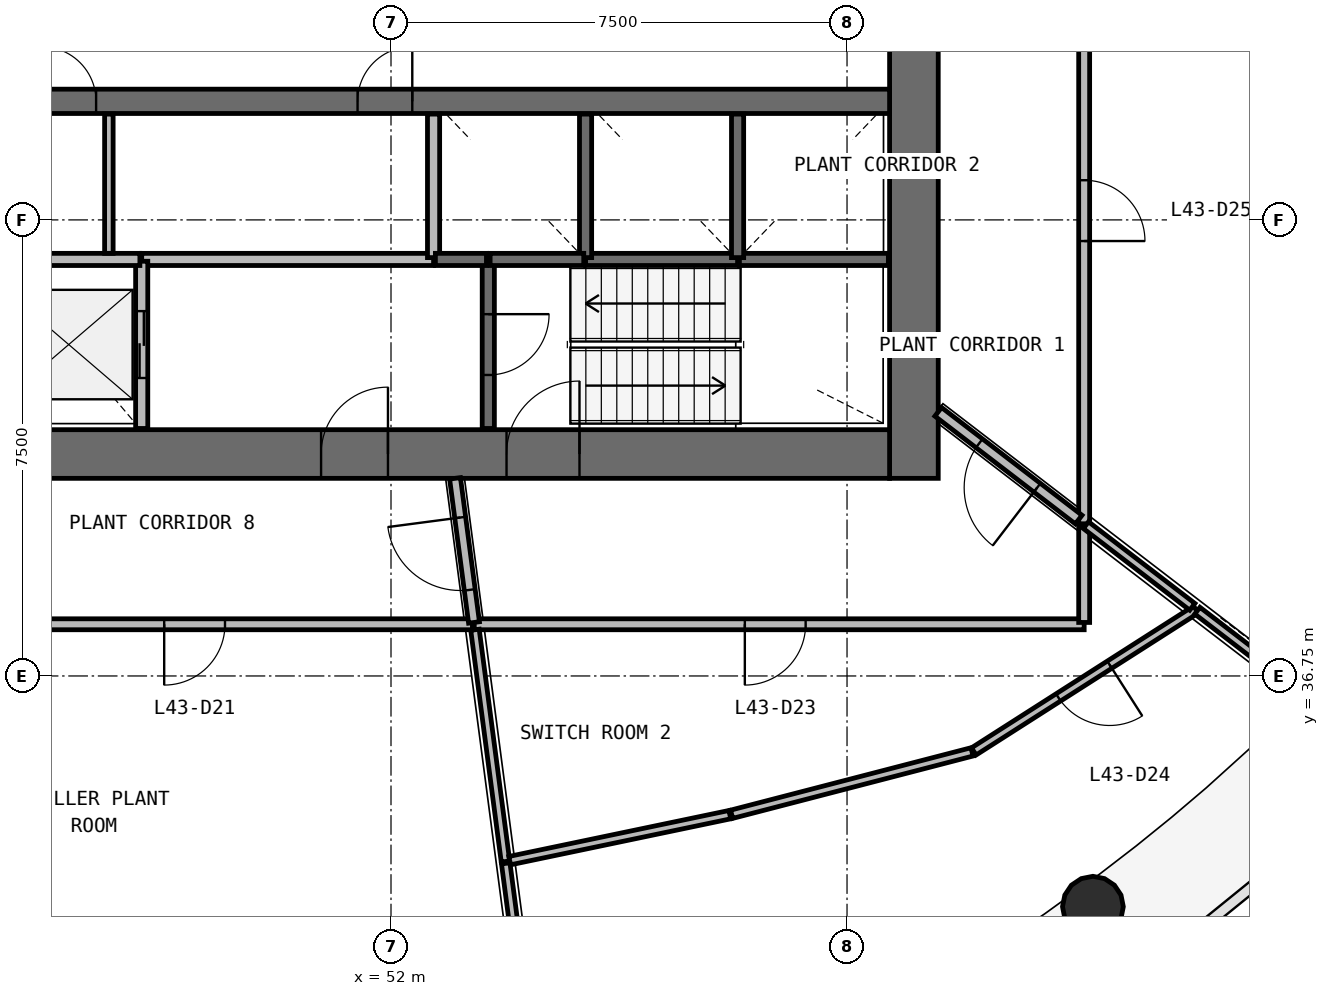
"""IFC4 building model, lengths in metres.
Left out: names, types, materials, properties, quantities, classifications, styles, units other than length and angle.
Written with IfcOpenShell. Run it as: python <this file> out.ifc"""

import sys

from ifc_helpers import new_model, si_unit, direction, frame, frame_2d, origin, origin_2d, place, context, subcontext, project, spatial, rectangle, circle, extrude, source, transform, mapped, element, fill, save


model = new_model("IFC4")
c1 = context("Model", 3, precision=1e-05, world=origin(), true_north=direction((0.0, 1.0)))
c2 = subcontext(c1, "Body", "Model", "MODEL_VIEW")
j1 = project(units=[si_unit("LENGTHUNIT", "METRE"), si_unit("PLANEANGLEUNIT", "RADIAN")], contexts=[c1])
p1 = place(None, origin())
s1 = spatial("IfcSite", under=j1, at=p1, CompositionType="ELEMENT")
p2 = place(p1, origin())
s2 = spatial("IfcBuilding", under=s1, at=p2, CompositionType="ELEMENT")
p3 = place(p2, frame((0.0, 0.0, 179.9)))
s3 = spatial("IfcBuildingStorey", under=s2, at=p3, CompositionType="ELEMENT", Elevation=179.9)
p4 = place(p3, frame((60.6, 40.0, 0.0), z_axis=(0.0, 0.0, 1.0), x_axis=(0.0, 1.0, 0.0)))
e1 = element("IfcWall", 1, at=p4, inside=s3, PredefinedType="SHEAR", context=c2, shape_type="SweptSolid", body=[
    extrude(rectangle(XDim=16.0, YDim=0.8, at=frame_2d((8.0, 0.0))), origin(), (0.0, 0.0, 1.0), 3.9),
])
p5 = place(p4, frame((7.1, 0.0, 0.0)))
e2 = element("IfcOpeningElement", 2, at=p5, cuts=e1, PredefinedType="OPENING", context=c2, shape_type="SweptSolid", body=[
    extrude(rectangle(XDim=1.8, YDim=2.1, at=frame_2d((0.9, 1.05))), frame((0.0, 0.41, 0.0), z_axis=(0.0, -1.0, 0.0), x_axis=(1.0, 0.0, 0.0)), (0.0, 0.0, 1.0), 0.82),
])
p6 = place(p3, frame((43.8, 40.4, 0.0), z_axis=(0.0, 0.0, 1.0), x_axis=(1.0, 0.0, 0.0)))
e3 = element("IfcWall", 3, at=p6, inside=s3, PredefinedType="SHEAR", context=c2, shape_type="SweptSolid", body=[
    extrude(rectangle(XDim=16.4, YDim=0.8, at=frame_2d((8.2, 0.0))), origin(), (0.0, 0.0, 1.0), 3.9),
])
p7 = place(p6, frame((10.1, 0.0, 0.0)))
e4 = element("IfcOpeningElement", 4, at=p7, cuts=e3, PredefinedType="OPENING", context=c2, shape_type="SweptSolid", body=[
    extrude(rectangle(XDim=1.2, YDim=2.1, at=frame_2d((0.6, 1.05))), frame((0.0, 0.41, 0.0), z_axis=(0.0, -1.0, 0.0), x_axis=(1.0, 0.0, 0.0)), (0.0, 0.0, 1.0), 0.82),
])
p8 = place(p6, frame((7.05, 0.0, 0.0)))
e5 = element("IfcOpeningElement", 5, at=p8, cuts=e3, PredefinedType="OPENING", context=c2, shape_type="SweptSolid", body=[
    extrude(rectangle(XDim=1.1, YDim=2.1, at=frame_2d((0.55, 1.05))), frame((0.0, 0.41, 0.0), z_axis=(0.0, -1.0, 0.0), x_axis=(1.0, 0.0, 0.0)), (0.0, 0.0, 1.0), 0.82),
])
p9 = place(p6, frame((0.5, 0.0, 0.0)))
e6 = element("IfcOpeningElement", 6, at=p9, cuts=e3, PredefinedType="OPENING", context=c2, shape_type="SweptSolid", body=[
    extrude(rectangle(XDim=0.8, YDim=2.1, at=frame_2d((0.4, 1.05))), frame((0.0, 0.41, 0.0), z_axis=(0.0, -1.0, 0.0), x_axis=(1.0, 0.0, 0.0)), (0.0, 0.0, 1.0), 0.82),
])
p10 = place(p3, frame((43.8, 46.2, 0.0), z_axis=(0.0, 0.0, 1.0), x_axis=(1.0, 0.0, 0.0)))
e7 = element("IfcWall", 7, at=p10, inside=s3, PredefinedType="SHEAR", context=c2, shape_type="SweptSolid", body=[
    extrude(rectangle(XDim=16.4, YDim=0.4, at=frame_2d((8.2, 0.0))), origin(), (0.0, 0.0, 1.0), 3.9),
])
p11 = place(p10, frame((2.45, 0.0, 0.0)))
e8 = element("IfcOpeningElement", 8, at=p11, cuts=e7, PredefinedType="OPENING", context=c2, shape_type="SweptSolid", body=[
    extrude(rectangle(XDim=0.9, YDim=2.1, at=frame_2d((0.45, 1.05))), frame((0.0, 0.21, 0.0), z_axis=(0.0, -1.0, 0.0), x_axis=(1.0, 0.0, 0.0)), (0.0, 0.0, 1.0), 0.42),
])
p12 = place(p10, frame((7.65, 0.0, 0.0)))
e9 = element("IfcOpeningElement", 9, at=p12, cuts=e7, PredefinedType="OPENING", context=c2, shape_type="SweptSolid", body=[
    extrude(rectangle(XDim=0.9, YDim=2.1, at=frame_2d((0.45, 1.05))), frame((0.0, 0.21, 0.0), z_axis=(0.0, -1.0, 0.0), x_axis=(1.0, 0.0, 0.0)), (0.0, 0.0, 1.0), 0.42),
])
m1 = source(origin(), c2, "Body", "SweptSolid", [
    extrude(circle(Radius=0.5, at=origin_2d()), origin(), (0.0, 0.0, 1.0), 3.58),
])
p13 = place(p3, frame((63.544, 32.956, 0.0), z_axis=(0.0, 0.0, 1.0), x_axis=(1.0, 0.0, 0.0)))
e10 = element("IfcColumn", 10, at=p13, inside=s3, PredefinedType="COLUMN", context=c2, shape_type="MappedRepresentation", body=[
    mapped(m1, transform((0.0, 0.0, 0.0), scale=1.0)),
])
p14 = place(p3, frame((52.7, 43.6, 0.0), z_axis=(0.0, 0.0, 1.0), x_axis=(-1.0, 0.0, 0.0)))
e11 = element("IfcWall", 11, at=p14, inside=s3, PredefinedType="SOLIDWALL", context=c2, shape_type="SweptSolid", body=[
    extrude(rectangle(XDim=4.8, YDim=0.2, at=frame_2d((2.4, 0.0))), origin(), (0.0, 0.0, 1.0), 3.58),
])
p15 = place(p3, frame((47.9, 40.82, 0.0), z_axis=(0.0, 0.0, 1.0), x_axis=(0.0, 1.0, 0.0)))
e12 = element("IfcWall", 12, at=p15, inside=s3, PredefinedType="SOLIDWALL", context=c2, shape_type="SweptSolid", body=[
    extrude(rectangle(XDim=2.75, YDim=0.2, at=frame_2d((1.375, 0.0))), origin(), (0.0, 0.0, 1.0), 3.58),
])
p16 = place(p15, frame((0.83, 0.0, 0.0)))
e13 = element("IfcOpeningElement", 13, at=p16, cuts=e12, PredefinedType="OPENING", context=c2, shape_type="SweptSolid", body=[
    extrude(rectangle(XDim=1.1, YDim=2.1, at=frame_2d((0.55, 1.05))), frame((0.0, 0.11, 0.0), z_axis=(0.0, -1.0, 0.0), x_axis=(1.0, 0.0, 0.0)), (0.0, 0.0, 1.0), 0.22),
])
p17 = place(p3, frame((53.6, 43.6, 0.0), z_axis=(0.0, 0.0, 1.0), x_axis=(0.0, -1.0, 0.0)))
e14 = element("IfcWall", 14, at=p17, inside=s3, PredefinedType="SOLIDWALL", context=c2, shape_type="SweptSolid", body=[
    extrude(rectangle(XDim=2.78, YDim=0.2, at=frame_2d((1.39, 0.0))), origin(), (0.0, 0.0, 1.0), 3.58),
])
p18 = place(p17, frame((0.9, 0.0, 0.0)))
e15 = element("IfcOpeningElement", 15, at=p18, cuts=e14, PredefinedType="OPENING", context=c2, shape_type="SweptSolid", body=[
    extrude(rectangle(XDim=1.0, YDim=2.1, at=frame_2d((0.5, 1.05))), frame((0.0, 0.11, 0.0), z_axis=(0.0, -1.0, 0.0), x_axis=(1.0, 0.0, 0.0)), (0.0, 0.0, 1.0), 0.22),
])
p19 = place(p3, frame((55.2, 43.6, 0.0), z_axis=(0.0, 0.0, 1.0), x_axis=(1.0, 0.0, 0.0)))
e16 = element("IfcWall", 16, at=p19, inside=s3, PredefinedType="SOLIDWALL", context=c2, shape_type="SweptSolid", body=[
    extrude(rectangle(XDim=2.5, YDim=0.2, at=frame_2d((1.25, 0.0))), origin(), (0.0, 0.0, 1.0), 3.58),
])
p20 = place(p3, frame((57.73, 43.6, 0.0), z_axis=(0.0, 0.0, 1.0), x_axis=(1.0, 0.0, 0.0)))
e17 = element("IfcWall", 17, at=p20, inside=s3, PredefinedType="SOLIDWALL", context=c2, shape_type="SweptSolid", body=[
    extrude(rectangle(XDim=2.45, YDim=0.2, at=frame_2d((1.225, 0.0))), origin(), (0.0, 0.0, 1.0), 3.58),
])
p21 = place(p3, frame((47.87, 43.6, 0.0), z_axis=(0.0, 0.0, 1.0), x_axis=(-1.0, 0.0, 0.0)))
e18 = element("IfcWall", 18, at=p21, inside=s3, PredefinedType="SOLIDWALL", context=c2, shape_type="SweptSolid", body=[
    extrude(rectangle(XDim=2.34, YDim=0.2, at=frame_2d((1.17, 0.0))), origin(), (0.0, 0.0, 1.0), 3.58),
])
for number, where, z_axis, x_axis in (
    (19, (52.7, 45.99, 0.0), (0.0, 0.0, 1.0), (0.0, -1.0, 0.0)),
    (20, (55.2, 43.63, 0.0), (0.0, 0.0, 1.0), (0.0, 1.0, 0.0)),
    (21, (57.7, 43.63, 0.0), (0.0, 0.0, 1.0), (0.0, 1.0, 0.0)),
):
    element("IfcWall", number, at=place(p3, frame(where, z_axis=z_axis, x_axis=x_axis)), inside=s3, PredefinedType="SOLIDWALL", context=c2, shape_type="SweptSolid", body=[
        extrude(rectangle(XDim=2.36, YDim=0.2, at=frame_2d((1.18, 0.0))), origin(), (0.0, 0.0, 1.0), 3.58),
    ])
p22 = place(p3, frame((53.63, 43.6, 0.0), z_axis=(0.0, 0.0, 1.0), x_axis=(1.0, 0.0, 0.0)))
e22 = element("IfcWall", 22, at=p22, inside=s3, PredefinedType="SOLIDWALL", context=c2, shape_type="SweptSolid", body=[
    extrude(rectangle(XDim=1.54, YDim=0.2, at=frame_2d((0.77, 0.0))), origin(), (0.0, 0.0, 1.0), 3.58),
])
p23 = place(p3, frame((52.73, 43.6, 0.0), z_axis=(0.0, 0.0, 1.0), x_axis=(1.0, 0.0, 0.0)))
e23 = element("IfcWall", 23, at=p23, inside=s3, PredefinedType="SOLIDWALL", context=c2, shape_type="SweptSolid", body=[
    extrude(rectangle(XDim=0.84, YDim=0.2, at=frame_2d((0.42, 0.0))), origin(), (0.0, 0.0, 1.0), 3.58),
])
p24 = place(p3, frame((63.4, 49.501, 0.0), z_axis=(0.0, 0.0, 1.0), x_axis=(0.0, -1.0, 0.0)))
e24 = element("IfcWall", 24, at=p24, inside=s3, PredefinedType="PARTITIONING", context=c2, shape_type="SweptSolid", body=[
    extrude(rectangle(XDim=10.248, YDim=0.18, at=frame_2d((5.124, 0.0))), origin(), (0.0, 0.0, 1.0), 2.38),
])
p25 = place(p24, frame((4.598, 0.0, 0.0)))
e25 = element("IfcOpeningElement", 25, at=p25, cuts=e24, PredefinedType="OPENING", context=c2, shape_type="SweptSolid", body=[
    extrude(rectangle(XDim=1.0, YDim=2.1, at=frame_2d((0.5, 1.05))), frame((0.0, 0.1, 0.0), z_axis=(0.0, -1.0, 0.0), x_axis=(1.0, 0.0, 0.0)), (0.0, 0.0, 1.0), 0.2),
])
p26 = place(p3, frame((63.4, 37.6, 0.0), z_axis=(0.0, 0.0, 1.0), x_axis=(-1.0, 0.0, 0.0)))
e26 = element("IfcWall", 26, at=p26, inside=s3, PredefinedType="PARTITIONING", context=c2, shape_type="SweptSolid", body=[
    extrude(rectangle(XDim=10.031, YDim=0.18, at=frame_2d((5.015, 0.0))), origin(), (0.0, 0.0, 1.0), 2.38),
])
p27 = place(p26, frame((4.581, 0.0, 0.0)))
e27 = element("IfcOpeningElement", 27, at=p27, cuts=e26, PredefinedType="OPENING", context=c2, shape_type="SweptSolid", body=[
    extrude(rectangle(XDim=1.0, YDim=2.1, at=frame_2d((0.5, 1.05))), frame((0.0, 0.1, 0.0), z_axis=(0.0, -1.0, 0.0), x_axis=(1.0, 0.0, 0.0)), (0.0, 0.0, 1.0), 0.2),
])
p28 = place(p3, frame((53.339, 37.6, 0.0), z_axis=(0.0, 0.0, 1.0), x_axis=(-1.0, 0.0, 0.0)))
e28 = element("IfcWall", 28, at=p28, inside=s3, PredefinedType="PARTITIONING", context=c2, shape_type="SweptSolid", body=[
    extrude(rectangle(XDim=9.319, YDim=0.18, at=frame_2d((4.66, 0.0))), origin(), (0.0, 0.0, 1.0), 2.38),
])
p29 = place(p28, frame((4.069, 0.0, 0.0)))
e29 = element("IfcOpeningElement", 29, at=p29, cuts=e28, PredefinedType="OPENING", context=c2, shape_type="SweptSolid", body=[
    extrude(rectangle(XDim=1.0, YDim=2.1, at=frame_2d((0.5, 1.05))), frame((0.0, 0.1, 0.0), z_axis=(0.0, -1.0, 0.0), x_axis=(1.0, 0.0, 0.0)), (0.0, 0.0, 1.0), 0.2),
])
p30 = place(p3, frame((63.31, 39.322, 0.0), z_axis=(0.0, 0.0, 1.0), x_axis=(-0.793371480341, 0.608737787706, 0.0)))
e30 = element("IfcWall", 30, at=p30, inside=s3, PredefinedType="PARTITIONING", context=c2, shape_type="SweptSolid", body=[
    extrude(rectangle(XDim=2.912, YDim=0.18, at=frame_2d((1.456, 0.0))), origin(), (0.0, 0.0, 1.0), 2.38),
])
p31 = place(p30, frame((0.862, 0.0, 0.0)))
e31 = element("IfcOpeningElement", 31, at=p31, cuts=e30, PredefinedType="OPENING", context=c2, shape_type="SweptSolid", body=[
    extrude(rectangle(XDim=1.2, YDim=2.1, at=frame_2d((0.6, 1.05))), frame((0.0, 0.1, 0.0), z_axis=(0.0, -1.0, 0.0), x_axis=(1.0, 0.0, 0.0)), (0.0, 0.0, 1.0), 0.2),
])
p32 = place(p3, frame((53.365, 37.63, 0.0), z_axis=(0.0, 0.0, 1.0), x_axis=(-0.130504701654, 0.991447690424, 0.0)))
e32 = element("IfcWall", 32, at=p32, inside=s3, PredefinedType="PARTITIONING", context=c2, shape_type="SweptSolid", body=[
    extrude(rectangle(XDim=2.391, YDim=0.18, at=frame_2d((1.195, 0.0))), origin(), (0.0, 0.0, 1.0), 2.38),
])
p33 = place(p32, frame((0.541, 0.0, 0.0)))
e33 = element("IfcOpeningElement", 33, at=p33, cuts=e32, PredefinedType="OPENING", context=c2, shape_type="SweptSolid", body=[
    extrude(rectangle(XDim=1.2, YDim=2.1, at=frame_2d((0.6, 1.05))), frame((0.0, 0.1, 0.0), z_axis=(0.0, -1.0, 0.0), x_axis=(1.0, 0.0, 0.0)), (0.0, 0.0, 1.0), 0.2),
])
p34 = place(p3, frame((63.4, 37.63, 0.0), z_axis=(0.0, 0.0, 1.0), x_axis=(0.0, 1.0, 0.0)))
e34 = element("IfcWall", 34, at=p34, inside=s3, PredefinedType="PARTITIONING", context=c2, shape_type="SweptSolid", body=[
    extrude(rectangle(XDim=1.593, YDim=0.18, at=frame_2d((0.796, 0.0))), origin(), (0.0, 0.0, 1.0), 2.38),
])
p35 = place(p3, frame((65.238, 37.842, 0.0), z_axis=(0.0, 0.0, 1.0), x_axis=(-0.842765106191, -0.538281502364, 0.0)))
e35 = element("IfcWall", 35, at=p35, inside=s3, PredefinedType="PARTITIONING", context=c2, shape_type="SweptSolid", body=[
    extrude(rectangle(XDim=4.335, YDim=0.14, at=frame_2d((2.167, 0.0))), origin(), (0.0, 0.0, 1.0), 2.38),
])
p36 = place(p35, frame((1.685, 0.0, 0.0)))
e36 = element("IfcOpeningElement", 36, at=p36, cuts=e35, PredefinedType="OPENING", context=c2, shape_type="SweptSolid", body=[
    extrude(rectangle(XDim=1.0, YDim=2.1, at=frame_2d((0.5, 1.05))), frame((0.0, 0.08, 0.0), z_axis=(0.0, -1.0, 0.0), x_axis=(1.0, 0.0, 0.0)), (0.0, 0.0, 1.0), 0.16),
])
p37 = place(p3, frame((57.602, 34.476, 0.0), z_axis=(0.0, 0.0, 1.0), x_axis=(0.96794524956, 0.251161290518, 0.0)))
e37 = element("IfcWall", 37, at=p37, inside=s3, PredefinedType="PARTITIONING", context=c2, shape_type="SweptSolid", body=[
    extrude(rectangle(XDim=4.084, YDim=0.14, at=frame_2d((2.042, 0.0))), origin(), (0.0, 0.0, 1.0), 2.38),
])
p38 = place(p3, frame((53.381, 37.51, 0.0), z_axis=(0.0, 0.0, 1.0), x_axis=(0.130503795096, -0.991447809754, 0.0)))
e38 = element("IfcWall", 38, at=p38, inside=s3, PredefinedType="PARTITIONING", context=c2, shape_type="SweptSolid", body=[
    extrude(rectangle(XDim=3.844, YDim=0.14, at=frame_2d((1.922, 0.0))), origin(), (0.0, 0.0, 1.0), 2.38),
])
p39 = place(p3, frame((53.951, 33.713, 0.0), z_axis=(0.0, 0.0, 1.0), x_axis=(0.978877627359, 0.204447036308, 0.0)))
e39 = element("IfcWall", 39, at=p39, inside=s3, PredefinedType="PARTITIONING", context=c2, shape_type="SweptSolid", body=[
    extrude(rectangle(XDim=3.699, YDim=0.14, at=frame_2d((1.85, 0.0))), origin(), (0.0, 0.0, 1.0), 2.38),
])
p40 = place(p3, frame((47.36, 43.7, 0.0), z_axis=(0.0, 0.0, 1.0), x_axis=(0.0, 1.0, 0.0)))
e40 = element("IfcWall", 40, at=p40, inside=s3, PredefinedType="PARTITIONING", context=c2, shape_type="SweptSolid", body=[
    extrude(rectangle(XDim=2.29, YDim=0.14, at=frame_2d((1.145, 0.0))), origin(), (0.0, 0.0, 1.0), 2.88),
])
p41 = place(p3, frame((63.429, 39.23, 0.0), z_axis=(0.0, 0.0, 1.0), x_axis=(0.793376463814, -0.608731292662, 0.0)))
e41 = element("IfcWall", 41, at=p41, inside=s3, PredefinedType="PARTITIONING", context=c2, shape_type="SweptSolid", body=[
    extrude(rectangle(XDim=2.206, YDim=0.14, at=frame_2d((1.103, 0.0))), origin(), (0.0, 0.0, 1.0), 2.38),
])
p42 = place(p3, frame((65.262, 37.824, 0.0), z_axis=(0.0, 0.0, 1.0), x_axis=(0.793315822565, -0.608810319942, 0.0)))
e42 = element("IfcWall", 42, at=p42, inside=s3, PredefinedType="PARTITIONING", context=c2, shape_type="SweptSolid", body=[
    extrude(rectangle(XDim=2.111, YDim=0.14, at=frame_2d((1.055, 0.0))), origin(), (0.0, 0.0, 1.0), 2.38),
])
p43 = place(p3, frame((53.887, 33.669, 0.0), z_axis=(0.0, 0.0, 1.0), x_axis=(0.130609007081, -0.991433955072, 0.0)))
e43 = element("IfcWall", 43, at=p43, inside=s3, PredefinedType="PARTITIONING", context=c2, shape_type="SweptSolid", body=[
    extrude(rectangle(XDim=1.553, YDim=0.14, at=frame_2d((0.777, 0.0))), origin(), (0.0, 0.0, 1.0), 2.38),
])
m2 = source(origin(), c2, "Body", "SweptSolid", [
    extrude(rectangle(XDim=1.1, YDim=2.1, at=frame_2d((0.55, 1.05))), frame((0.0, 0.025, 0.0), z_axis=(0.0, -1.0, 0.0), x_axis=(1.0, 0.0, 0.0)), (0.0, 0.0, 1.0), 0.05),
])
p44 = place(p16, origin())
e44 = element("IfcDoor", 44, at=p44, inside=s3, OperationType="DOUBLE_DOOR_SLIDING", PredefinedType="USERDEFINED", context=c2, shape_type="MappedRepresentation", body=[
    mapped(m2, transform((0.0, 0.0, 0.0), scale=1.0)),
])
fill(e13, e44)
m3 = source(origin(), c2, "Body", "SweptSolid", [
    extrude(rectangle(XDim=1.2, YDim=2.1, at=frame_2d((0.6, 1.05))), frame((0.0, 0.025, 0.0), z_axis=(0.0, -1.0, 0.0), x_axis=(1.0, 0.0, 0.0)), (0.0, 0.0, 1.0), 0.05),
])
p45 = place(p7, origin())
e45 = element("IfcDoor", 45, at=p45, inside=s3, OperationType="SINGLE_SWING_RIGHT", PredefinedType="DOOR", context=c2, shape_type="MappedRepresentation", body=[
    mapped(m3, transform((0.0, 0.0, 0.0), scale=1.0)),
])
fill(e4, e45)
m4 = source(origin(), c2, "Body", "SweptSolid", [
    extrude(rectangle(XDim=1.0, YDim=2.1, at=frame_2d((0.5, 1.05))), frame((0.0, 0.025, 0.0), z_axis=(0.0, -1.0, 0.0), x_axis=(1.0, 0.0, 0.0)), (0.0, 0.0, 1.0), 0.05),
])
p46 = place(p18, origin())
e46 = element("IfcDoor", 46, at=p46, inside=s3, OperationType="SINGLE_SWING_LEFT", PredefinedType="DOOR", context=c2, shape_type="MappedRepresentation", body=[
    mapped(m4, transform((0.0, 0.0, 0.0), scale=1.0)),
])
fill(e15, e46)
m5 = source(origin(), c2, "Body", "SweptSolid", [
    extrude(rectangle(XDim=1.1, YDim=2.1, at=frame_2d((0.55, 1.05))), frame((0.0, 0.025, 0.0), z_axis=(0.0, -1.0, 0.0), x_axis=(1.0, 0.0, 0.0)), (0.0, 0.0, 1.0), 0.05),
])
p47 = place(p8, origin())
e47 = element("IfcDoor", 47, at=p47, inside=s3, OperationType="SINGLE_SWING_RIGHT", PredefinedType="DOOR", context=c2, shape_type="MappedRepresentation", body=[
    mapped(m5, transform((0.0, 0.0, 0.0), scale=1.0)),
])
fill(e5, e47)
m6 = source(origin(), c2, "Body", "SweptSolid", [
    extrude(rectangle(XDim=1.0, YDim=2.1, at=frame_2d((0.5, 1.05))), frame((0.0, 0.025, 0.0), z_axis=(0.0, -1.0, 0.0), x_axis=(1.0, 0.0, 0.0)), (0.0, 0.0, 1.0), 0.05),
])
p48 = place(p29, origin())
e48 = element("IfcDoor", 48, at=p48, inside=s3, OperationType="SINGLE_SWING_RIGHT", PredefinedType="DOOR", context=c2, shape_type="MappedRepresentation", body=[
    mapped(m6, transform((0.0, 0.0, 0.0), scale=1.0)),
])
fill(e29, e48)
p49 = place(p27, origin())
e49 = element("IfcDoor", 49, at=p49, inside=s3, OperationType="SINGLE_SWING_RIGHT", PredefinedType="DOOR", context=c2, shape_type="MappedRepresentation", body=[
    mapped(m6, transform((0.0, 0.0, 0.0), scale=1.0)),
])
fill(e27, e49)
p50 = place(p36, origin())
e50 = element("IfcDoor", 50, at=p50, inside=s3, OperationType="SINGLE_SWING_LEFT", PredefinedType="DOOR", context=c2, shape_type="MappedRepresentation", body=[
    mapped(m6, transform((0.0, 0.0, 0.0), scale=1.0)),
])
fill(e36, e50)
p51 = place(p25, origin())
e51 = element("IfcDoor", 51, at=p51, inside=s3, OperationType="SINGLE_SWING_RIGHT", PredefinedType="DOOR", context=c2, shape_type="MappedRepresentation", body=[
    mapped(m6, transform((0.0, 0.0, 0.0), scale=1.0)),
])
fill(e25, e51)
m7 = source(origin(), c2, "Body", "SweptSolid", [
    extrude(rectangle(XDim=1.2, YDim=2.1, at=frame_2d((0.6, 1.05))), frame((0.0, 0.025, 0.0), z_axis=(0.0, -1.0, 0.0), x_axis=(1.0, 0.0, 0.0)), (0.0, 0.0, 1.0), 0.05),
])
p52 = place(p33, origin())
e52 = element("IfcDoor", 52, at=p52, inside=s3, OperationType="SINGLE_SWING_RIGHT", PredefinedType="DOOR", context=c2, shape_type="MappedRepresentation", body=[
    mapped(m7, transform((0.0, 0.0, 0.0), scale=1.0)),
])
fill(e33, e52)
p53 = place(p31, origin())
e53 = element("IfcDoor", 53, at=p53, inside=s3, OperationType="SINGLE_SWING_LEFT", PredefinedType="DOOR", context=c2, shape_type="MappedRepresentation", body=[
    mapped(m7, transform((0.0, 0.0, 0.0), scale=1.0)),
])
fill(e31, e53)
m8 = source(origin(), c2, "Body", "SweptSolid", [
    extrude(rectangle(XDim=0.9, YDim=2.1, at=frame_2d((0.45, 1.05))), frame((0.0, 0.025, 0.0), z_axis=(0.0, -1.0, 0.0), x_axis=(1.0, 0.0, 0.0)), (0.0, 0.0, 1.0), 0.05),
])
p54 = place(p11, origin())
e54 = element("IfcDoor", 54, at=p54, inside=s3, OperationType="SINGLE_SWING_LEFT", PredefinedType="DOOR", context=c2, shape_type="MappedRepresentation", body=[
    mapped(m8, transform((0.0, 0.0, 0.0), scale=1.0)),
])
fill(e8, e54)
p55 = place(p12, origin())
e55 = element("IfcDoor", 55, at=p55, inside=s3, OperationType="SINGLE_SWING_RIGHT", PredefinedType="DOOR", context=c2, shape_type="MappedRepresentation", body=[
    mapped(m8, transform((0.0, 0.0, 0.0), scale=1.0)),
])
fill(e9, e55)
save(model, sys.argv[1])
